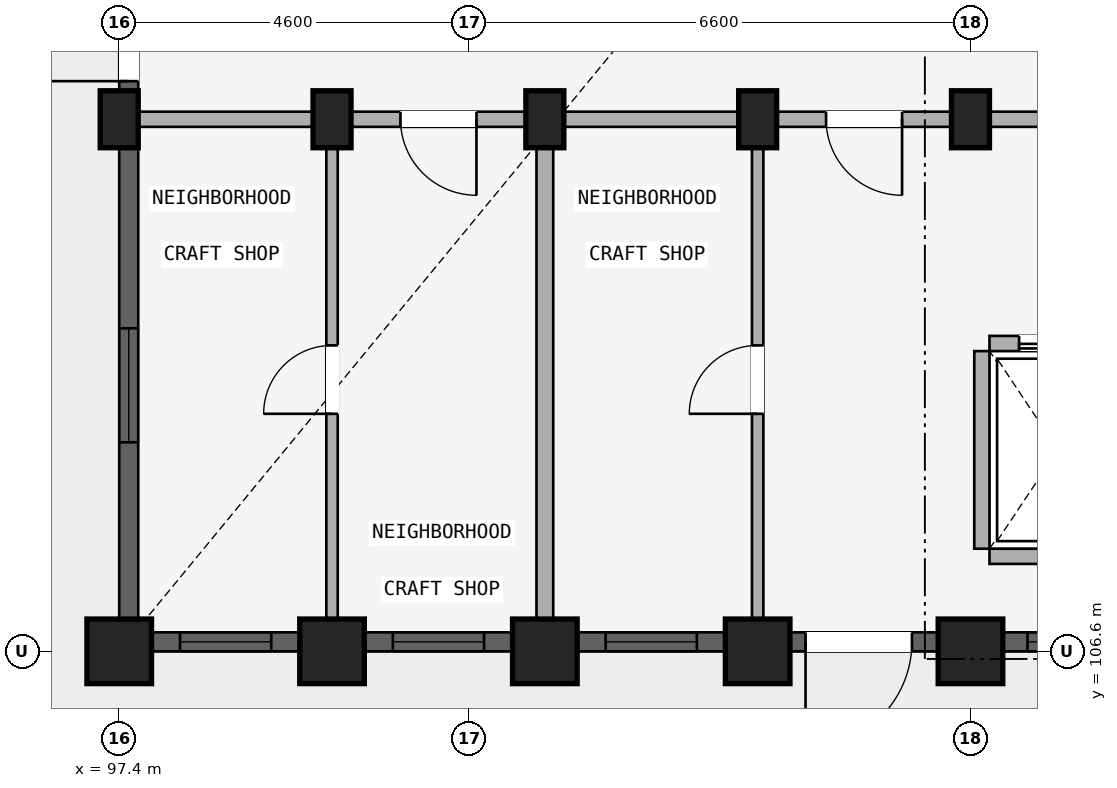
"""IFC4 building model, lengths in metres.
Left out: names, types, materials, properties, quantities, classifications, styles, units other than length and angle.
Written with IfcOpenShell. Run it as: python <this file> out.ifc"""

import sys

from ifc_helpers import new_model, si_unit, direction, frame, frame_2d, origin, origin_2d, place, context, subcontext, project, spatial, rectangle, extrude, element, fill, save


model = new_model("IFC4")
c1 = context("Model", 3, precision=1e-05, world=origin(), true_north=direction((0.0, 1.0)))
c2 = subcontext(c1, "Body", "Model", "MODEL_VIEW")
j1 = project(units=[si_unit("LENGTHUNIT", "METRE"), si_unit("PLANEANGLEUNIT", "RADIAN")], contexts=[c1])
p1 = place(None, origin())
s1 = spatial("IfcSite", under=j1, at=p1, CompositionType="ELEMENT")
p2 = place(p1, origin())
s2 = spatial("IfcBuilding", under=s1, at=p2, CompositionType="ELEMENT")
p3 = place(p2, origin())
s3 = spatial("IfcBuildingStorey", under=s2, at=p3, CompositionType="ELEMENT", Elevation=0.0)
p4 = place(p3, frame((108.6, 106.6, 0.0), z_axis=(0.0, 0.0, 1.0), x_axis=(1.0, 0.0, 0.0)))
e1 = element("IfcColumn", 1, at=p4, inside=s3, PredefinedType="COLUMN", context=c2, shape_type="SweptSolid", body=[
    extrude(rectangle(XDim=0.85, YDim=0.85, at=origin_2d()), origin(), (0.0, 0.0, 1.0), 4.15),
])
p5 = place(p3, frame((108.6, 113.6, 0.0), z_axis=(0.0, 0.0, 1.0), x_axis=(1.0, 0.0, 0.0)))
e2 = element("IfcColumn", 2, at=p5, inside=s3, PredefinedType="COLUMN", context=c2, shape_type="SweptSolid", body=[
    extrude(rectangle(XDim=0.5, YDim=0.75, at=origin_2d()), origin(), (0.0, 0.0, 1.0), 4.15),
])
p6 = place(p3, frame((105.8, 106.6, 0.0), z_axis=(0.0, 0.0, 1.0), x_axis=(1.0, 0.0, 0.0)))
e3 = element("IfcColumn", 3, at=p6, inside=s3, PredefinedType="COLUMN", context=c2, shape_type="SweptSolid", body=[
    extrude(rectangle(XDim=0.85, YDim=0.85, at=origin_2d()), origin(), (0.0, 0.0, 1.0), 4.15),
])
p7 = place(p3, frame((105.8, 113.6, 0.0), z_axis=(0.0, 0.0, 1.0), x_axis=(1.0, 0.0, 0.0)))
e4 = element("IfcColumn", 4, at=p7, inside=s3, PredefinedType="COLUMN", context=c2, shape_type="SweptSolid", body=[
    extrude(rectangle(XDim=0.5, YDim=0.75, at=origin_2d()), origin(), (0.0, 0.0, 1.0), 4.15),
])
p8 = place(p3, frame((103.0, 106.6, 0.0), z_axis=(0.0, 0.0, 1.0), x_axis=(1.0, 0.0, 0.0)))
e5 = element("IfcColumn", 5, at=p8, inside=s3, PredefinedType="COLUMN", context=c2, shape_type="SweptSolid", body=[
    extrude(rectangle(XDim=0.85, YDim=0.85, at=origin_2d()), origin(), (0.0, 0.0, 1.0), 4.15),
])
p9 = place(p3, frame((103.0, 113.6, 0.0), z_axis=(0.0, 0.0, 1.0), x_axis=(1.0, 0.0, 0.0)))
e6 = element("IfcColumn", 6, at=p9, inside=s3, PredefinedType="COLUMN", context=c2, shape_type="SweptSolid", body=[
    extrude(rectangle(XDim=0.5, YDim=0.75, at=origin_2d()), origin(), (0.0, 0.0, 1.0), 4.15),
])
p10 = place(p3, frame((100.2, 106.6, 0.0), z_axis=(0.0, 0.0, 1.0), x_axis=(1.0, 0.0, 0.0)))
e7 = element("IfcColumn", 7, at=p10, inside=s3, PredefinedType="COLUMN", context=c2, shape_type="SweptSolid", body=[
    extrude(rectangle(XDim=0.85, YDim=0.85, at=origin_2d()), origin(), (0.0, 0.0, 1.0), 4.15),
])
p11 = place(p3, frame((100.2, 113.6, 0.0), z_axis=(0.0, 0.0, 1.0), x_axis=(1.0, 0.0, 0.0)))
e8 = element("IfcColumn", 8, at=p11, inside=s3, PredefinedType="COLUMN", context=c2, shape_type="SweptSolid", body=[
    extrude(rectangle(XDim=0.5, YDim=0.75, at=origin_2d()), origin(), (0.0, 0.0, 1.0), 4.15),
])
p12 = place(p3, frame((97.4, 106.6, 0.0), z_axis=(0.0, 0.0, 1.0), x_axis=(1.0, 0.0, 0.0)))
e9 = element("IfcColumn", 9, at=p12, inside=s3, PredefinedType="COLUMN", context=c2, shape_type="SweptSolid", body=[
    extrude(rectangle(XDim=0.85, YDim=0.85, at=origin_2d()), origin(), (0.0, 0.0, 1.0), 4.15),
])
p13 = place(p3, frame((97.4, 113.6, 0.0), z_axis=(0.0, 0.0, 1.0), x_axis=(1.0, 0.0, 0.0)))
e10 = element("IfcColumn", 10, at=p13, inside=s3, PredefinedType="COLUMN", context=c2, shape_type="SweptSolid", body=[
    extrude(rectangle(XDim=0.5, YDim=0.75, at=origin_2d()), origin(), (0.0, 0.0, 1.0), 4.15),
])
p14 = place(p3, frame((108.75, 107.95, 0.0), z_axis=(0.0, 0.0, 1.0), x_axis=(0.0, 1.0, 0.0)))
e11 = element("IfcWall", 11, at=p14, inside=s3, PredefinedType="STANDARD", context=c2, shape_type="SweptSolid", body=[
    extrude(rectangle(XDim=2.6, YDim=0.2, at=frame_2d((1.3, 0.0))), origin(), (0.0, 0.0, 1.0), 3.492),
])
p15 = place(p3, frame((110.65, 107.85, 0.0), z_axis=(0.0, 0.0, 1.0), x_axis=(-1.0, 0.0, 0.0)))
e12 = element("IfcWall", 12, at=p15, inside=s3, PredefinedType="STANDARD", context=c2, shape_type="SweptSolid", body=[
    extrude(rectangle(XDim=1.8, YDim=0.2, at=frame_2d((0.9, 0.0))), origin(), (0.0, 0.0, 1.0), 4.15),
])
p16 = place(p3, frame((110.65, 110.65, 0.0), z_axis=(0.0, 0.0, 1.0), x_axis=(-1.0, 0.0, 0.0)))
e13 = element("IfcWall", 13, at=p16, inside=s3, PredefinedType="STANDARD", context=c2, shape_type="SweptSolid", body=[
    extrude(rectangle(XDim=1.8, YDim=0.2, at=frame_2d((0.9, 0.0))), origin(), (0.0, 0.0, 1.0), 4.15),
])
p17 = place(p16, frame((0.39, 0.0, 0.0)))
e14 = element("IfcOpeningElement", 14, at=p17, cuts=e13, PredefinedType="OPENING", context=c2, shape_type="SweptSolid", body=[
    extrude(rectangle(XDim=1.02, YDim=2.15, at=frame_2d((0.51, 1.075))), frame((0.0, 0.11, 0.0), z_axis=(0.0, -1.0, 0.0), x_axis=(1.0, 0.0, 0.0)), (0.0, 0.0, 1.0), 0.22),
])
p18 = place(p3, frame((114.25, 113.6, 0.0), z_axis=(0.0, 0.0, 1.0), x_axis=(-1.0, 0.0, 0.0)))
e15 = element("IfcWall", 15, at=p18, inside=s3, PredefinedType="STANDARD", context=c2, shape_type="SweptSolid", body=[
    extrude(rectangle(XDim=5.6, YDim=0.2, at=frame_2d((2.8, 0.0))), origin(), (0.0, 0.0, 1.0), 3.492),
])
p19 = place(p18, frame((1.91, 0.0, 0.0)))
e16 = element("IfcOpeningElement", 16, at=p19, cuts=e15, PredefinedType="OPENING", context=c2, shape_type="SweptSolid", body=[
    extrude(rectangle(XDim=1.22, YDim=2.15, at=frame_2d((0.61, 1.075))), frame((0.0, 0.11, 0.0), z_axis=(0.0, -1.0, 0.0), x_axis=(1.0, 0.0, 0.0)), (0.0, 0.0, 1.0), 0.22),
])
p20 = place(p3, frame((108.6, 113.6, 0.0), z_axis=(0.0, 0.0, 1.0), x_axis=(-1.0, 0.0, 0.0)))
e17 = element("IfcWall", 17, at=p20, inside=s3, PredefinedType="STANDARD", context=c2, shape_type="SweptSolid", body=[
    extrude(rectangle(XDim=2.8, YDim=0.2, at=frame_2d((1.4, 0.0))), origin(), (0.0, 0.0, 1.0), 3.492),
])
p21 = place(p20, frame((0.9, 0.0, 0.0)))
e18 = element("IfcOpeningElement", 18, at=p21, cuts=e17, PredefinedType="OPENING", context=c2, shape_type="SweptSolid", body=[
    extrude(rectangle(XDim=1.0, YDim=2.15, at=frame_2d((0.5, 1.075))), frame((0.0, 0.11, 0.0), z_axis=(0.0, -1.0, 0.0), x_axis=(1.0, 0.0, 0.0)), (0.0, 0.0, 1.0), 0.22),
])
p22 = place(p3, frame((105.8, 113.6, 0.0), z_axis=(0.0, 0.0, 1.0), x_axis=(-1.0, 0.0, 0.0)))
e19 = element("IfcWall", 19, at=p22, inside=s3, PredefinedType="STANDARD", context=c2, shape_type="SweptSolid", body=[
    extrude(rectangle(XDim=2.8, YDim=0.2, at=frame_2d((1.4, 0.0))), origin(), (0.0, 0.0, 1.0), 3.492),
])
p23 = place(p3, frame((103.0, 113.6, 0.0), z_axis=(0.0, 0.0, 1.0), x_axis=(-1.0, 0.0, 0.0)))
e20 = element("IfcWall", 20, at=p23, inside=s3, PredefinedType="STANDARD", context=c2, shape_type="SweptSolid", body=[
    extrude(rectangle(XDim=2.8, YDim=0.2, at=frame_2d((1.4, 0.0))), origin(), (0.0, 0.0, 1.0), 3.492),
])
p24 = place(p23, frame((0.9, 0.0, 0.0)))
e21 = element("IfcOpeningElement", 21, at=p24, cuts=e20, PredefinedType="OPENING", context=c2, shape_type="SweptSolid", body=[
    extrude(rectangle(XDim=1.0, YDim=2.15, at=frame_2d((0.5, 1.075))), frame((0.0, 0.11, 0.0), z_axis=(0.0, -1.0, 0.0), x_axis=(1.0, 0.0, 0.0)), (0.0, 0.0, 1.0), 0.22),
])
p25 = place(p3, frame((100.2, 113.6, 0.0), z_axis=(0.0, 0.0, 1.0), x_axis=(-1.0, 0.0, 0.0)))
e22 = element("IfcWall", 22, at=p25, inside=s3, PredefinedType="STANDARD", context=c2, shape_type="SweptSolid", body=[
    extrude(rectangle(XDim=2.8, YDim=0.2, at=frame_2d((1.4, 0.0))), origin(), (0.0, 0.0, 1.0), 3.492),
])
p26 = place(p3, frame((105.8, 106.8, 0.0), z_axis=(0.0, 0.0, 1.0), x_axis=(0.0, 1.0, 0.0)))
e23 = element("IfcWall", 23, at=p26, inside=s3, PredefinedType="PARTITIONING", context=c2, shape_type="SweptSolid", body=[
    extrude(rectangle(XDim=6.75, YDim=0.15, at=frame_2d((3.375, 0.0))), origin(), (0.0, 0.0, 1.0), 3.492),
])
p27 = place(p26, frame((2.925, 0.0, 0.0)))
e24 = element("IfcOpeningElement", 24, at=p27, cuts=e23, PredefinedType="OPENING", context=c2, shape_type="SweptSolid", body=[
    extrude(rectangle(XDim=0.9, YDim=2.1, at=frame_2d((0.45, 1.05))), frame((0.0, 0.085, 0.0), z_axis=(0.0, -1.0, 0.0), x_axis=(1.0, 0.0, 0.0)), (0.0, 0.0, 1.0), 0.17),
])
p28 = place(p3, frame((103.0, 106.8, 0.0), z_axis=(0.0, 0.0, 1.0), x_axis=(0.0, 1.0, 0.0)))
e25 = element("IfcWall", 25, at=p28, inside=s3, PredefinedType="STANDARD", context=c2, shape_type="SweptSolid", body=[
    extrude(rectangle(XDim=6.75, YDim=0.22, at=frame_2d((3.375, 0.0))), origin(), (0.0, 0.0, 1.0), 3.492),
])
p29 = place(p3, frame((100.2, 106.8, 0.0), z_axis=(0.0, 0.0, 1.0), x_axis=(0.0, 1.0, 0.0)))
e26 = element("IfcWall", 26, at=p29, inside=s3, PredefinedType="PARTITIONING", context=c2, shape_type="SweptSolid", body=[
    extrude(rectangle(XDim=6.75, YDim=0.15, at=frame_2d((3.375, 0.0))), origin(), (0.0, 0.0, 1.0), 3.492),
])
p30 = place(p29, frame((2.925, 0.0, 0.0)))
e27 = element("IfcOpeningElement", 27, at=p30, cuts=e26, PredefinedType="OPENING", context=c2, shape_type="SweptSolid", body=[
    extrude(rectangle(XDim=0.9, YDim=2.1, at=frame_2d((0.45, 1.05))), frame((0.0, 0.085, 0.0), z_axis=(0.0, -1.0, 0.0), x_axis=(1.0, 0.0, 0.0)), (0.0, 0.0, 1.0), 0.17),
])
p31 = place(p3, frame((111.372, 106.725, 0.0), z_axis=(0.0, 0.0, 1.0), x_axis=(-1.0, 0.0, 0.0)))
e28 = element("IfcWall", 28, at=p31, inside=s3, PredefinedType="STANDARD", context=c2, shape_type="SweptSolid", body=[
    extrude(rectangle(XDim=2.422, YDim=0.25, at=frame_2d((1.211, 0.0))), origin(), (0.0, 0.0, 1.0), 3.692),
])
p32 = place(p31, frame((0.822, 0.0, 0.88)))
e29 = element("IfcOpeningElement", 29, at=p32, cuts=e28, PredefinedType="OPENING", context=c2, shape_type="SweptSolid", body=[
    extrude(rectangle(XDim=1.2, YDim=1.5, at=frame_2d((0.6, 0.75))), frame((0.0, 0.135, 0.0), z_axis=(0.0, -1.0, 0.0), x_axis=(1.0, 0.0, 0.0)), (0.0, 0.0, 1.0), 0.27),
])
p33 = place(p3, frame((108.18, 106.725, 0.0), z_axis=(0.0, 0.0, 1.0), x_axis=(-1.0, 0.0, 0.0)))
e30 = element("IfcWall", 30, at=p33, inside=s3, PredefinedType="STANDARD", context=c2, shape_type="SweptSolid", body=[
    extrude(rectangle(XDim=1.96, YDim=0.25, at=frame_2d((0.98, 0.0))), origin(), (0.0, 0.0, 1.0), 3.692),
])
p34 = place(p33, frame((0.35, 0.0, 0.0)))
e31 = element("IfcOpeningElement", 31, at=p34, cuts=e30, PredefinedType="OPENING", context=c2, shape_type="SweptSolid", body=[
    extrude(rectangle(XDim=1.4, YDim=2.15, at=frame_2d((0.7, 1.075))), frame((0.0, 0.135, 0.0), z_axis=(0.0, -1.0, 0.0), x_axis=(1.0, 0.0, 0.0)), (0.0, 0.0, 1.0), 0.27),
])
p35 = place(p3, frame((105.38, 106.725, 0.0), z_axis=(0.0, 0.0, 1.0), x_axis=(-1.0, 0.0, 0.0)))
e32 = element("IfcWall", 32, at=p35, inside=s3, PredefinedType="STANDARD", context=c2, shape_type="SweptSolid", body=[
    extrude(rectangle(XDim=1.96, YDim=0.25, at=frame_2d((0.98, 0.0))), origin(), (0.0, 0.0, 1.0), 3.692),
])
p36 = place(p35, frame((0.38, 0.0, 0.88)))
e33 = element("IfcOpeningElement", 33, at=p36, cuts=e32, PredefinedType="OPENING", context=c2, shape_type="SweptSolid", body=[
    extrude(rectangle(XDim=1.2, YDim=1.5, at=frame_2d((0.6, 0.75))), frame((0.0, 0.135, 0.0), z_axis=(0.0, -1.0, 0.0), x_axis=(1.0, 0.0, 0.0)), (0.0, 0.0, 1.0), 0.27),
])
p37 = place(p3, frame((102.58, 106.725, 0.0), z_axis=(0.0, 0.0, 1.0), x_axis=(-1.0, 0.0, 0.0)))
e34 = element("IfcWall", 34, at=p37, inside=s3, PredefinedType="STANDARD", context=c2, shape_type="SweptSolid", body=[
    extrude(rectangle(XDim=1.96, YDim=0.25, at=frame_2d((0.98, 0.0))), origin(), (0.0, 0.0, 1.0), 3.692),
])
p38 = place(p37, frame((0.38, 0.0, 0.88)))
e35 = element("IfcOpeningElement", 35, at=p38, cuts=e34, PredefinedType="OPENING", context=c2, shape_type="SweptSolid", body=[
    extrude(rectangle(XDim=1.2, YDim=1.5, at=frame_2d((0.6, 0.75))), frame((0.0, 0.135, 0.0), z_axis=(0.0, -1.0, 0.0), x_axis=(1.0, 0.0, 0.0)), (0.0, 0.0, 1.0), 0.27),
])
p39 = place(p3, frame((99.78, 106.725, 0.0), z_axis=(0.0, 0.0, 1.0), x_axis=(-1.0, 0.0, 0.0)))
e36 = element("IfcWall", 36, at=p39, inside=s3, PredefinedType="STANDARD", context=c2, shape_type="SweptSolid", body=[
    extrude(rectangle(XDim=1.96, YDim=0.25, at=frame_2d((0.98, 0.0))), origin(), (0.0, 0.0, 1.0), 3.692),
])
p40 = place(p39, frame((0.38, 0.0, 0.88)))
e37 = element("IfcOpeningElement", 37, at=p40, cuts=e36, PredefinedType="OPENING", context=c2, shape_type="SweptSolid", body=[
    extrude(rectangle(XDim=1.2, YDim=1.5, at=frame_2d((0.6, 0.75))), frame((0.0, 0.135, 0.0), z_axis=(0.0, -1.0, 0.0), x_axis=(1.0, 0.0, 0.0)), (0.0, 0.0, 1.0), 0.27),
])
p41 = place(p3, frame((97.525, 107.02, 0.0), z_axis=(0.0, 0.0, 1.0), x_axis=(0.0, 1.0, 0.0)))
e38 = element("IfcWall", 38, at=p41, inside=s3, PredefinedType="STANDARD", context=c2, shape_type="SweptSolid", body=[
    extrude(rectangle(XDim=6.201, YDim=0.25, at=frame_2d((3.101, 0.0))), origin(), (0.0, 0.0, 1.0), 3.492),
])
p42 = place(p41, frame((2.33, 0.0, 0.88)))
e39 = element("IfcOpeningElement", 39, at=p42, cuts=e38, PredefinedType="OPENING", context=c2, shape_type="SweptSolid", body=[
    extrude(rectangle(XDim=1.5, YDim=1.65, at=frame_2d((0.75, 0.825))), frame((0.0, 0.135, 0.0), z_axis=(0.0, -1.0, 0.0), x_axis=(1.0, 0.0, 0.0)), (0.0, 0.0, 1.0), 0.27),
])
p43 = place(p3, frame((97.525, 113.979, 0.0), z_axis=(0.0, 0.0, 1.0), x_axis=(0.0, 1.0, 0.0)))
e40 = element("IfcWall", 40, at=p43, inside=s3, PredefinedType="STANDARD", context=c2, shape_type="SweptSolid", body=[
    extrude(rectangle(XDim=1.643, YDim=0.25, at=frame_2d((0.822, 0.0))), origin(), (0.0, 0.0, 1.0), 3.492),
])
p44 = place(p43, frame((0.123, 0.0, 0.0)))
e41 = element("IfcOpeningElement", 41, at=p44, cuts=e40, PredefinedType="OPENING", context=c2, shape_type="SweptSolid", body=[
    extrude(rectangle(XDim=1.4, YDim=2.15, at=frame_2d((0.7, 1.075))), frame((0.0, 0.135, 0.0), z_axis=(0.0, -1.0, 0.0), x_axis=(1.0, 0.0, 0.0)), (0.0, 0.0, 1.0), 0.27),
])
p45 = place(p32, origin())
e42 = element("IfcWindow", 42, at=p45, inside=s3, PartitioningType="SINGLE_PANEL", PredefinedType="WINDOW", context=c2, shape_type="SweptSolid", body=[
    extrude(rectangle(XDim=1.2, YDim=1.5, at=frame_2d((0.6, 0.75))), frame((0.0, 0.03, 0.0), z_axis=(0.0, -1.0, 0.0), x_axis=(1.0, 0.0, 0.0)), (0.0, 0.0, 1.0), 0.06),
])
fill(e29, e42)
p46 = place(p36, origin())
e43 = element("IfcWindow", 43, at=p46, inside=s3, PartitioningType="SINGLE_PANEL", PredefinedType="WINDOW", context=c2, shape_type="SweptSolid", body=[
    extrude(rectangle(XDim=1.2, YDim=1.5, at=frame_2d((0.6, 0.75))), frame((0.0, 0.03, 0.0), z_axis=(0.0, -1.0, 0.0), x_axis=(1.0, 0.0, 0.0)), (0.0, 0.0, 1.0), 0.06),
])
fill(e33, e43)
p47 = place(p38, origin())
e44 = element("IfcWindow", 44, at=p47, inside=s3, PartitioningType="SINGLE_PANEL", PredefinedType="WINDOW", context=c2, shape_type="SweptSolid", body=[
    extrude(rectangle(XDim=1.2, YDim=1.5, at=frame_2d((0.6, 0.75))), frame((0.0, 0.03, 0.0), z_axis=(0.0, -1.0, 0.0), x_axis=(1.0, 0.0, 0.0)), (0.0, 0.0, 1.0), 0.06),
])
fill(e35, e44)
p48 = place(p40, origin())
e45 = element("IfcWindow", 45, at=p48, inside=s3, PartitioningType="SINGLE_PANEL", PredefinedType="WINDOW", context=c2, shape_type="SweptSolid", body=[
    extrude(rectangle(XDim=1.2, YDim=1.5, at=frame_2d((0.6, 0.75))), frame((0.0, 0.03, 0.0), z_axis=(0.0, -1.0, 0.0), x_axis=(1.0, 0.0, 0.0)), (0.0, 0.0, 1.0), 0.06),
])
fill(e37, e45)
p49 = place(p42, origin())
e46 = element("IfcWindow", 46, at=p49, inside=s3, PartitioningType="DOUBLE_PANEL_VERTICAL", PredefinedType="WINDOW", context=c2, shape_type="SweptSolid", body=[
    extrude(rectangle(XDim=1.5, YDim=1.65, at=frame_2d((0.75, 0.825))), frame((0.0, 0.03, 0.0), z_axis=(0.0, -1.0, 0.0), x_axis=(1.0, 0.0, 0.0)), (0.0, 0.0, 1.0), 0.06),
])
fill(e39, e46)
p50 = place(p17, origin())
e47 = element("IfcDoor", 47, at=p50, inside=s3, OperationType="SLIDING_TO_RIGHT", PredefinedType="DOOR", context=c2, shape_type="SweptSolid", body=[
    extrude(rectangle(XDim=1.02, YDim=2.15, at=frame_2d((0.51, 1.075))), frame((0.0, 0.025, 0.0), z_axis=(0.0, -1.0, 0.0), x_axis=(1.0, 0.0, 0.0)), (0.0, 0.0, 1.0), 0.05),
])
fill(e14, e47)
p51 = place(p21, frame((1.0, 0.0, 0.0), z_axis=(0.0, 0.0, 1.0), x_axis=(-1.0, 0.0, 0.0)))
e48 = element("IfcDoor", 48, at=p51, inside=s3, OperationType="SINGLE_SWING_RIGHT", PredefinedType="DOOR", context=c2, shape_type="SweptSolid", body=[
    extrude(rectangle(XDim=1.0, YDim=2.15, at=frame_2d((0.5, 1.075))), frame((0.0, 0.025, 0.0), z_axis=(0.0, -1.0, 0.0), x_axis=(1.0, 0.0, 0.0)), (0.0, 0.0, 1.0), 0.05),
])
fill(e18, e48)
p52 = place(p24, frame((1.0, 0.0, 0.0), z_axis=(0.0, 0.0, 1.0), x_axis=(-1.0, 0.0, 0.0)))
e49 = element("IfcDoor", 49, at=p52, inside=s3, OperationType="SINGLE_SWING_RIGHT", PredefinedType="DOOR", context=c2, shape_type="SweptSolid", body=[
    extrude(rectangle(XDim=1.0, YDim=2.15, at=frame_2d((0.5, 1.075))), frame((0.0, 0.025, 0.0), z_axis=(0.0, -1.0, 0.0), x_axis=(1.0, 0.0, 0.0)), (0.0, 0.0, 1.0), 0.05),
])
fill(e21, e49)
p53 = place(p27, origin())
e50 = element("IfcDoor", 50, at=p53, inside=s3, OperationType="SINGLE_SWING_LEFT", PredefinedType="DOOR", context=c2, shape_type="SweptSolid", body=[
    extrude(rectangle(XDim=0.9, YDim=2.1, at=frame_2d((0.45, 1.05))), frame((0.0, 0.025, 0.0), z_axis=(0.0, -1.0, 0.0), x_axis=(1.0, 0.0, 0.0)), (0.0, 0.0, 1.0), 0.05),
])
fill(e24, e50)
p54 = place(p30, frame((0.9, 0.0, 0.0), z_axis=(0.0, 0.0, 1.0), x_axis=(-1.0, 0.0, 0.0)))
e51 = element("IfcDoor", 51, at=p54, inside=s3, OperationType="SINGLE_SWING_RIGHT", PredefinedType="DOOR", context=c2, shape_type="SweptSolid", body=[
    extrude(rectangle(XDim=0.9, YDim=2.1, at=frame_2d((0.45, 1.05))), frame((0.0, 0.025, 0.0), z_axis=(0.0, -1.0, 0.0), x_axis=(1.0, 0.0, 0.0)), (0.0, 0.0, 1.0), 0.05),
])
fill(e27, e51)
p55 = place(p34, origin())
e52 = element("IfcDoor", 52, at=p55, inside=s3, OperationType="SINGLE_SWING_RIGHT", PredefinedType="DOOR", context=c2, shape_type="SweptSolid", body=[
    extrude(rectangle(XDim=1.4, YDim=2.15, at=frame_2d((0.7, 1.075))), frame((0.0, 0.025, 0.0), z_axis=(0.0, -1.0, 0.0), x_axis=(1.0, 0.0, 0.0)), (0.0, 0.0, 1.0), 0.05),
])
fill(e31, e52)
p56 = place(p44, origin())
e53 = element("IfcDoor", 53, at=p56, inside=s3, OperationType="SINGLE_SWING_LEFT", PredefinedType="DOOR", context=c2, shape_type="SweptSolid", body=[
    extrude(rectangle(XDim=1.4, YDim=2.15, at=frame_2d((0.7, 1.075))), frame((0.0, 0.025, 0.0), z_axis=(0.0, -1.0, 0.0), x_axis=(1.0, 0.0, 0.0)), (0.0, 0.0, 1.0), 0.05),
])
fill(e41, e53)
save(model, sys.argv[1])
